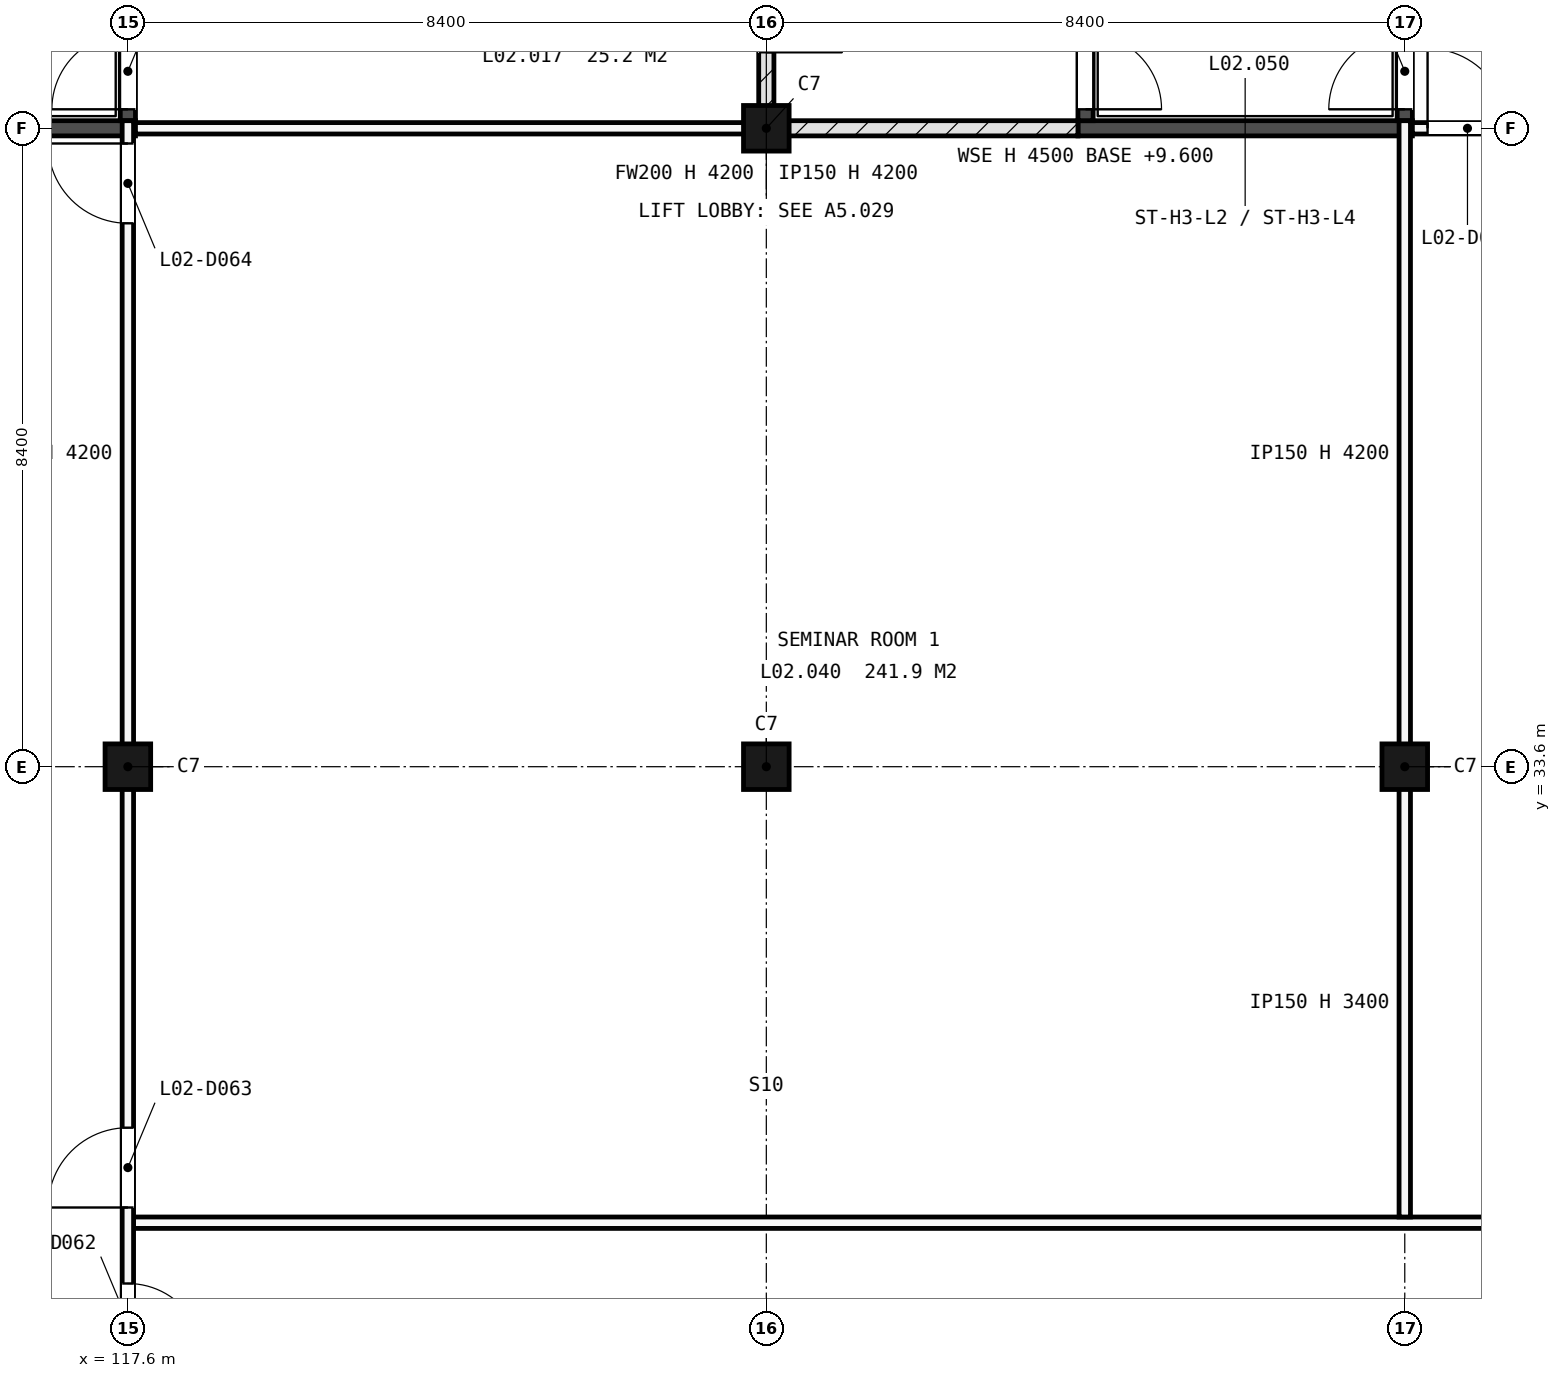
"""IFC4 building model, lengths in metres.
Left out: names, types, materials, properties, quantities, classifications, styles, units other than length and angle.
Written with IfcOpenShell. Run it as: python <this file> out.ifc"""

import sys

from ifc_helpers import new_model, si_unit, direction, frame, frame_2d, origin, origin_2d, place, context, subcontext, project, spatial, rectangle, extrude, element, fill, save


model = new_model("IFC4")
c1 = context("Model", 3, precision=1e-05, world=origin(), true_north=direction((0.0, 1.0)))
c2 = subcontext(c1, "Body", "Model", "MODEL_VIEW")
j1 = project(units=[si_unit("LENGTHUNIT", "METRE"), si_unit("PLANEANGLEUNIT", "RADIAN")], contexts=[c1])
p1 = place(None, origin())
s1 = spatial("IfcSite", under=j1, at=p1, CompositionType="ELEMENT")
p2 = place(p1, origin())
s2 = spatial("IfcBuilding", under=s1, at=p2, CompositionType="ELEMENT")
p3 = place(p2, frame((0.0, 0.0, 9.9)))
s3 = spatial("IfcBuildingStorey", under=s2, at=p3, CompositionType="ELEMENT", Elevation=9.9)
for number, where, z_axis, x_axis in (
    (1, (117.6, 33.6, -0.25), (0.0, 0.0, 1.0), (1.0, 0.0, 0.0)),
    (2, (126.0, 33.6, -0.25), (0.0, 0.0, 1.0), (1.0, 0.0, 0.0)),
    (3, (126.0, 42.0, -0.25), (0.0, 0.0, 1.0), (1.0, 0.0, 0.0)),
    (4, (134.4, 33.6, -0.25), (0.0, 0.0, 1.0), (1.0, 0.0, 0.0)),
):
    element("IfcColumn", number, at=place(p3, frame(where, z_axis=z_axis, x_axis=x_axis)), inside=s3, PredefinedType="COLUMN", context=c2, shape_type="SweptSolid", body=[
        extrude(rectangle(XDim=0.6, YDim=0.6, at=origin_2d()), origin(), (0.0, 0.0, 1.0), 4.45),
    ])
p4 = place(p3, frame((130.1, 42.0, -0.3), z_axis=(0.0, 0.0, 1.0), x_axis=(1.0, 0.0, 0.0)))
e5 = element("IfcWall", 5, at=p4, inside=s3, PredefinedType="SHEAR", context=c2, shape_type="SweptSolid", body=[
    extrude(rectangle(XDim=4.4, YDim=0.2, at=frame_2d((2.2, 0.0))), origin(), (0.0, 0.0, 1.0), 4.5),
])
p5 = place(p3, frame((130.2, 42.1, -0.3), z_axis=(0.0, 0.0, 1.0), x_axis=(0.0, 1.0, 0.0)))
e6 = element("IfcWall", 6, at=p5, inside=s3, PredefinedType="SHEAR", context=c2, shape_type="SweptSolid", body=[
    extrude(rectangle(XDim=7.925, YDim=0.2, at=frame_2d((3.962, 0.0))), origin(), (0.0, 0.0, 1.0), 4.5),
])
p6 = place(p5, frame((0.15, 0.0, 0.3)))
e7 = element("IfcOpeningElement", 7, at=p6, cuts=e6, PredefinedType="OPENING", context=c2, shape_type="SweptSolid", body=[
    extrude(rectangle(XDim=1.0, YDim=2.1, at=frame_2d((0.5, 1.05))), frame((0.0, 0.11, 0.0), z_axis=(0.0, -1.0, 0.0), x_axis=(1.0, 0.0, 0.0)), (0.0, 0.0, 1.0), 0.22),
])
p7 = place(p3, frame((134.4, 42.1, -0.3), z_axis=(0.0, 0.0, 1.0), x_axis=(0.0, 1.0, 0.0)))
e8 = element("IfcWall", 8, at=p7, inside=s3, PredefinedType="SHEAR", context=c2, shape_type="SweptSolid", body=[
    extrude(rectangle(XDim=7.925, YDim=0.2, at=frame_2d((3.962, 0.0))), origin(), (0.0, 0.0, 1.0), 4.5),
])
p8 = place(p7, frame((0.15, 0.0, 0.3)))
e9 = element("IfcOpeningElement", 9, at=p8, cuts=e8, PredefinedType="OPENING", context=c2, shape_type="SweptSolid", body=[
    extrude(rectangle(XDim=1.0, YDim=2.1, at=frame_2d((0.5, 1.05))), frame((0.0, 0.11, 0.0), z_axis=(0.0, -1.0, 0.0), x_axis=(1.0, 0.0, 0.0)), (0.0, 0.0, 1.0), 0.22),
])
p9 = place(p3, frame((113.3, 42.0, -0.3), z_axis=(0.0, 0.0, 1.0), x_axis=(1.0, 0.0, 0.0)))
e10 = element("IfcWall", 10, at=p9, inside=s3, PredefinedType="SHEAR", context=c2, shape_type="SweptSolid", body=[
    extrude(rectangle(XDim=4.4, YDim=0.2, at=frame_2d((2.2, 0.0))), origin(), (0.0, 0.0, 1.0), 4.5),
])
p10 = place(p9, frame((1.15, 0.0, 0.3)))
e11 = element("IfcOpeningElement", 11, at=p10, cuts=e10, PredefinedType="OPENING", context=c2, shape_type="SweptSolid", body=[
    extrude(rectangle(XDim=2.1, YDim=2.1, at=frame_2d((1.05, 1.05))), frame((0.0, 0.11, 0.0), z_axis=(0.0, -1.0, 0.0), x_axis=(1.0, 0.0, 0.0)), (0.0, 0.0, 1.0), 0.22),
])
p11 = place(p3, frame((117.6, 42.1, -0.3), z_axis=(0.0, 0.0, 1.0), x_axis=(0.0, 1.0, 0.0)))
e12 = element("IfcWall", 12, at=p11, inside=s3, PredefinedType="SHEAR", context=c2, shape_type="SweptSolid", body=[
    extrude(rectangle(XDim=7.925, YDim=0.2, at=frame_2d((3.962, 0.0))), origin(), (0.0, 0.0, 1.0), 4.5),
])
p12 = place(p11, frame((0.15, 0.0, 0.3)))
e13 = element("IfcOpeningElement", 13, at=p12, cuts=e12, PredefinedType="OPENING", context=c2, shape_type="SweptSolid", body=[
    extrude(rectangle(XDim=1.0, YDim=2.1, at=frame_2d((0.5, 1.05))), frame((0.0, 0.11, 0.0), z_axis=(0.0, -1.0, 0.0), x_axis=(1.0, 0.0, 0.0)), (0.0, 0.0, 1.0), 0.22),
])
p13 = place(p3, frame((117.675, 27.6, 0.0), z_axis=(0.0, 0.0, 1.0), x_axis=(1.0, 0.0, 0.0)))
e14 = element("IfcWall", 14, at=p13, inside=s3, PredefinedType="PARTITIONING", context=c2, shape_type="SweptSolid", body=[
    extrude(rectangle(XDim=50.325, YDim=0.15, at=frame_2d((25.163, 0.0))), origin(), (0.0, 0.0, 1.0), 4.2),
])
p14 = place(p3, frame((117.7, 42.0, 0.0), z_axis=(0.0, 0.0, 1.0), x_axis=(1.0, 0.0, 0.0)))
e15 = element("IfcWall", 15, at=p14, inside=s3, PredefinedType="PARTITIONING", context=c2, shape_type="SweptSolid", body=[
    extrude(rectangle(XDim=8.3, YDim=0.15, at=frame_2d((4.15, 0.0))), origin(), (0.0, 0.0, 1.0), 4.2),
])
p15 = place(p3, frame((126.0, 42.0, 0.0), z_axis=(0.0, 0.0, 1.0), x_axis=(1.0, 0.0, 0.0)))
e16 = element("IfcWall", 16, at=p15, inside=s3, PredefinedType="SOLIDWALL", context=c2, shape_type="SweptSolid", body=[
    extrude(rectangle(XDim=4.1, YDim=0.2, at=frame_2d((2.05, 0.0))), origin(), (0.0, 0.0, 1.0), 4.2),
])
p16 = place(p3, frame((134.5, 42.0, 0.0), z_axis=(0.0, 0.0, 1.0), x_axis=(1.0, 0.0, 0.0)))
e17 = element("IfcWall", 17, at=p16, inside=s3, PredefinedType="PARTITIONING", context=c2, shape_type="SweptSolid", body=[
    extrude(rectangle(XDim=8.1, YDim=0.15, at=frame_2d((4.05, 0.0))), origin(), (0.0, 0.0, 1.0), 3.55),
])
p17 = place(p16, frame((0.2, 0.0, 0.0)))
e18 = element("IfcOpeningElement", 18, at=p17, cuts=e17, PredefinedType="OPENING", context=c2, shape_type="SweptSolid", body=[
    extrude(rectangle(XDim=1.05, YDim=2.1, at=frame_2d((0.525, 1.05))), frame((0.0, 0.085, 0.0), z_axis=(0.0, -1.0, 0.0), x_axis=(1.0, 0.0, 0.0)), (0.0, 0.0, 1.0), 0.17),
])
p18 = place(p3, frame((117.6, 25.275, 0.0), z_axis=(0.0, 0.0, 1.0), x_axis=(0.0, 1.0, 0.0)))
e19 = element("IfcWall", 19, at=p18, inside=s3, PredefinedType="PARTITIONING", context=c2, shape_type="SweptSolid", body=[
    extrude(rectangle(XDim=8.045, YDim=0.15, at=frame_2d((4.022, 0.0))), origin(), (0.0, 0.0, 1.0), 3.4),
])
p19 = place(p18, frame((2.525, 0.0, 0.0)))
e20 = element("IfcOpeningElement", 20, at=p19, cuts=e19, PredefinedType="OPENING", context=c2, shape_type="SweptSolid", body=[
    extrude(rectangle(XDim=1.05, YDim=2.1, at=frame_2d((0.525, 1.05))), frame((0.0, 0.085, 0.0), z_axis=(0.0, -1.0, 0.0), x_axis=(1.0, 0.0, 0.0)), (0.0, 0.0, 1.0), 0.17),
])
p20 = place(p18, frame((0.525, 0.0, 0.0)))
e21 = element("IfcOpeningElement", 21, at=p20, cuts=e19, PredefinedType="OPENING", context=c2, shape_type="SweptSolid", body=[
    extrude(rectangle(XDim=1.0, YDim=2.1, at=frame_2d((0.5, 1.05))), frame((0.0, 0.085, 0.0), z_axis=(0.0, -1.0, 0.0), x_axis=(1.0, 0.0, 0.0)), (0.0, 0.0, 1.0), 0.17),
])
p21 = place(p3, frame((117.6, 33.32, 0.0), z_axis=(0.0, 0.0, 1.0), x_axis=(0.0, 1.0, 0.0)))
e22 = element("IfcWall", 22, at=p21, inside=s3, PredefinedType="PARTITIONING", context=c2, shape_type="SweptSolid", body=[
    extrude(rectangle(XDim=8.78, YDim=0.15, at=frame_2d((4.39, 0.0))), origin(), (0.0, 0.0, 1.0), 4.2),
])
p22 = place(p21, frame((7.43, 0.0, 0.0)))
e23 = element("IfcOpeningElement", 23, at=p22, cuts=e22, PredefinedType="OPENING", context=c2, shape_type="SweptSolid", body=[
    extrude(rectangle(XDim=1.05, YDim=2.1, at=frame_2d((0.525, 1.05))), frame((0.0, 0.085, 0.0), z_axis=(0.0, -1.0, 0.0), x_axis=(1.0, 0.0, 0.0)), (0.0, 0.0, 1.0), 0.17),
])
p23 = place(p3, frame((126.0, 42.1, 0.0), z_axis=(0.0, 0.0, 1.0), x_axis=(0.0, 1.0, 0.0)))
e24 = element("IfcWall", 24, at=p23, inside=s3, PredefinedType="SOLIDWALL", context=c2, shape_type="SweptSolid", body=[
    extrude(rectangle(XDim=8.3, YDim=0.2, at=frame_2d((4.15, 0.0))), origin(), (0.0, 0.0, 1.0), 3.4),
])
p24 = place(p23, frame((0.9, 0.0, 0.0)))
e25 = element("IfcOpeningElement", 25, at=p24, cuts=e24, PredefinedType="OPENING", context=c2, shape_type="SweptSolid", body=[
    extrude(rectangle(XDim=1.0, YDim=2.1, at=frame_2d((0.5, 1.05))), frame((0.0, 0.11, 0.0), z_axis=(0.0, -1.0, 0.0), x_axis=(1.0, 0.0, 0.0)), (0.0, 0.0, 1.0), 0.22),
])
p25 = place(p3, frame((134.4, 27.675, 0.0), z_axis=(0.0, 0.0, 1.0), x_axis=(0.0, 1.0, 0.0)))
e26 = element("IfcWall", 26, at=p25, inside=s3, PredefinedType="PARTITIONING", context=c2, shape_type="SweptSolid", body=[
    extrude(rectangle(XDim=5.645, YDim=0.15, at=frame_2d((2.823, 0.0))), origin(), (0.0, 0.0, 1.0), 3.4),
])
p26 = place(p3, frame((134.4, 33.32, 0.0), z_axis=(0.0, 0.0, 1.0), x_axis=(0.0, 1.0, 0.0)))
e27 = element("IfcWall", 27, at=p26, inside=s3, PredefinedType="PARTITIONING", context=c2, shape_type="SweptSolid", body=[
    extrude(rectangle(XDim=8.78, YDim=0.15, at=frame_2d((4.39, 0.0))), origin(), (0.0, 0.0, 1.0), 4.2),
])
p27 = place(p6, origin())
e28 = element("IfcDoor", 28, at=p27, inside=s3, OperationType="SINGLE_SWING_LEFT", PredefinedType="DOOR", context=c2, shape_type="SweptSolid", body=[
    extrude(rectangle(XDim=1.0, YDim=2.1, at=frame_2d((0.5, 1.05))), frame((0.0, 0.025, 0.0), z_axis=(0.0, -1.0, 0.0), x_axis=(1.0, 0.0, 0.0)), (0.0, 0.0, 1.0), 0.05),
])
fill(e7, e28)
p28 = place(p8, origin())
e29 = element("IfcDoor", 29, at=p28, inside=s3, OperationType="SINGLE_SWING_RIGHT", PredefinedType="DOOR", context=c2, shape_type="SweptSolid", body=[
    extrude(rectangle(XDim=1.0, YDim=2.1, at=frame_2d((0.5, 1.05))), frame((0.0, 0.025, 0.0), z_axis=(0.0, -1.0, 0.0), x_axis=(1.0, 0.0, 0.0)), (0.0, 0.0, 1.0), 0.05),
])
fill(e9, e29)
p29 = place(p12, origin())
e30 = element("IfcDoor", 30, at=p29, inside=s3, OperationType="SINGLE_SWING_RIGHT", PredefinedType="DOOR", context=c2, shape_type="SweptSolid", body=[
    extrude(rectangle(XDim=1.0, YDim=2.1, at=frame_2d((0.5, 1.05))), frame((0.0, 0.025, 0.0), z_axis=(0.0, -1.0, 0.0), x_axis=(1.0, 0.0, 0.0)), (0.0, 0.0, 1.0), 0.05),
])
fill(e13, e30)
p30 = place(p19, origin())
e31 = element("IfcDoor", 31, at=p30, inside=s3, OperationType="SINGLE_SWING_RIGHT", PredefinedType="DOOR", context=c2, shape_type="SweptSolid", body=[
    extrude(rectangle(XDim=1.05, YDim=2.1, at=frame_2d((0.525, 1.05))), frame((0.0, 0.025, 0.0), z_axis=(0.0, -1.0, 0.0), x_axis=(1.0, 0.0, 0.0)), (0.0, 0.0, 1.0), 0.05),
])
fill(e20, e31)
p31 = place(p22, origin())
e32 = element("IfcDoor", 32, at=p31, inside=s3, OperationType="SINGLE_SWING_LEFT", PredefinedType="DOOR", context=c2, shape_type="SweptSolid", body=[
    extrude(rectangle(XDim=1.05, YDim=2.1, at=frame_2d((0.525, 1.05))), frame((0.0, 0.025, 0.0), z_axis=(0.0, -1.0, 0.0), x_axis=(1.0, 0.0, 0.0)), (0.0, 0.0, 1.0), 0.05),
])
fill(e23, e32)
p32 = place(p17, origin())
e33 = element("IfcDoor", 33, at=p32, inside=s3, OperationType="SINGLE_SWING_RIGHT", PredefinedType="DOOR", context=c2, shape_type="SweptSolid", body=[
    extrude(rectangle(XDim=1.05, YDim=2.1, at=frame_2d((0.525, 1.05))), frame((0.0, 0.025, 0.0), z_axis=(0.0, -1.0, 0.0), x_axis=(1.0, 0.0, 0.0)), (0.0, 0.0, 1.0), 0.05),
])
fill(e18, e33)
p33 = place(p20, origin())
e34 = element("IfcDoor", 34, at=p33, inside=s3, OperationType="SINGLE_SWING_LEFT", PredefinedType="DOOR", context=c2, shape_type="SweptSolid", body=[
    extrude(rectangle(XDim=1.0, YDim=2.1, at=frame_2d((0.5, 1.05))), frame((0.0, 0.025, 0.0), z_axis=(0.0, -1.0, 0.0), x_axis=(1.0, 0.0, 0.0)), (0.0, 0.0, 1.0), 0.05),
])
fill(e21, e34)
save(model, sys.argv[1])
